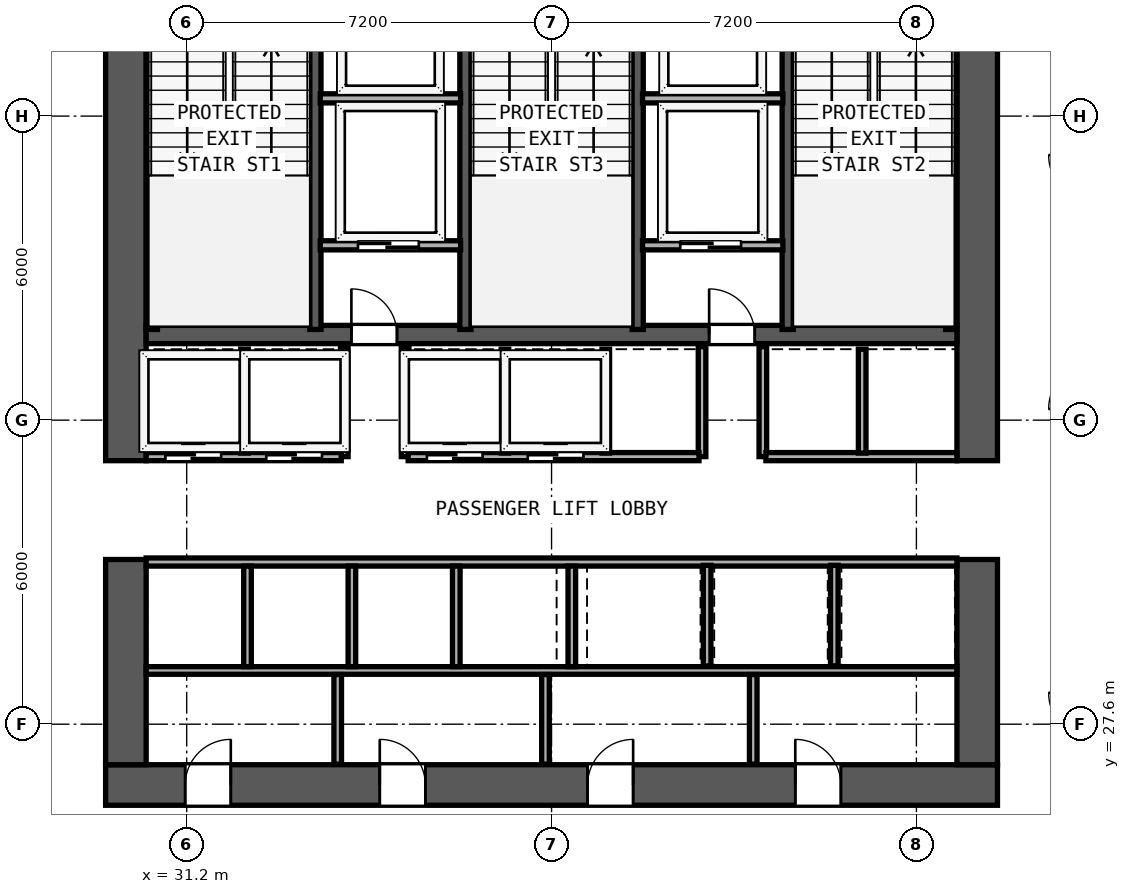
"""IFC4 building model, lengths in metres.
Left out: names, types, materials, properties, quantities, classifications, styles, units other than length and angle.
Written with IfcOpenShell. Run it as: python <this file> out.ifc"""

import sys

from ifc_helpers import new_model, si_unit, direction, frame, frame_2d, origin, place, context, subcontext, project, spatial, rectangle, extrude, element, fill, save


model = new_model("IFC4")
c1 = context("Model", 3, precision=1e-05, world=origin(), true_north=direction((0.0, 1.0)))
c2 = subcontext(c1, "Body", "Model", "MODEL_VIEW")
j1 = project(units=[si_unit("LENGTHUNIT", "METRE"), si_unit("PLANEANGLEUNIT", "RADIAN")], contexts=[c1])
p1 = place(None, origin())
s1 = spatial("IfcSite", under=j1, at=p1, CompositionType="ELEMENT")
p2 = place(p1, origin())
s2 = spatial("IfcBuilding", under=s1, at=p2, CompositionType="ELEMENT")
p3 = place(p2, frame((0.0, 0.0, 85.6)))
s3 = spatial("IfcBuildingStorey", under=s2, at=p3, CompositionType="ELEMENT", Elevation=85.6)
p4 = place(p3, frame((29.6, 26.4, 0.0), z_axis=(0.0, 0.0, 1.0), x_axis=(1.0, 0.0, 0.0)))
e1 = element("IfcWall", 1, at=p4, inside=s3, PredefinedType="SHEAR", context=c2, shape_type="SweptSolid", body=[
    extrude(rectangle(XDim=17.6, YDim=0.8, at=frame_2d((8.8, 0.0))), origin(), (0.0, 0.0, 1.0), 3.54),
])
p5 = place(p4, frame((2.47, 0.0, 0.0), z_axis=(0.0, 0.0, 1.0), x_axis=(-1.0, 0.0, 0.0)))
e2 = element("IfcOpeningElement", 2, at=p5, cuts=e1, PredefinedType="OPENING", context=c2, shape_type="SweptSolid", body=[
    extrude(rectangle(XDim=0.9, YDim=2.1, at=frame_2d((0.45, 1.05))), frame((0.0, 0.41, 0.0), z_axis=(0.0, -1.0, 0.0), x_axis=(1.0, 0.0, 0.0)), (0.0, 0.0, 1.0), 0.82),
])
p6 = place(p4, frame((6.31, 0.0, 0.0), z_axis=(0.0, 0.0, 1.0), x_axis=(-1.0, 0.0, 0.0)))
e3 = element("IfcOpeningElement", 3, at=p6, cuts=e1, PredefinedType="OPENING", context=c2, shape_type="SweptSolid", body=[
    extrude(rectangle(XDim=0.9, YDim=2.1, at=frame_2d((0.45, 1.05))), frame((0.0, 0.41, 0.0), z_axis=(0.0, -1.0, 0.0), x_axis=(1.0, 0.0, 0.0)), (0.0, 0.0, 1.0), 0.82),
])
p7 = place(p4, frame((10.41, 0.0, 0.0), z_axis=(0.0, 0.0, 1.0), x_axis=(-1.0, 0.0, 0.0)))
e4 = element("IfcOpeningElement", 4, at=p7, cuts=e1, PredefinedType="OPENING", context=c2, shape_type="SweptSolid", body=[
    extrude(rectangle(XDim=0.9, YDim=2.1, at=frame_2d((0.45, 1.05))), frame((0.0, 0.41, 0.0), z_axis=(0.0, -1.0, 0.0), x_axis=(1.0, 0.0, 0.0)), (0.0, 0.0, 1.0), 0.82),
])
p8 = place(p4, frame((14.51, 0.0, 0.0), z_axis=(0.0, 0.0, 1.0), x_axis=(-1.0, 0.0, 0.0)))
e5 = element("IfcOpeningElement", 5, at=p8, cuts=e1, PredefinedType="OPENING", context=c2, shape_type="SweptSolid", body=[
    extrude(rectangle(XDim=0.9, YDim=2.1, at=frame_2d((0.45, 1.05))), frame((0.0, 0.41, 0.0), z_axis=(0.0, -1.0, 0.0), x_axis=(1.0, 0.0, 0.0)), (0.0, 0.0, 1.0), 0.82),
])
p9 = place(p3, frame((30.0, 26.8, 0.0), z_axis=(0.0, 0.0, 1.0), x_axis=(0.0, 1.0, 0.0)))
e6 = element("IfcWall", 6, at=p9, inside=s3, PredefinedType="SHEAR", context=c2, shape_type="SweptSolid", body=[
    extrude(rectangle(XDim=4.05, YDim=0.8, at=frame_2d((2.025, 0.0))), origin(), (0.0, 0.0, 1.0), 3.54),
])
p10 = place(p3, frame((30.0, 32.8, 0.0), z_axis=(0.0, 0.0, 1.0), x_axis=(0.0, 1.0, 0.0)))
e7 = element("IfcWall", 7, at=p10, inside=s3, PredefinedType="SHEAR", context=c2, shape_type="SweptSolid", body=[
    extrude(rectangle(XDim=10.0, YDim=0.8, at=frame_2d((5.0, 0.0))), origin(), (0.0, 0.0, 1.0), 3.54),
])
p11 = place(p3, frame((46.8, 26.8, 0.0), z_axis=(0.0, 0.0, 1.0), x_axis=(0.0, 1.0, 0.0)))
e8 = element("IfcWall", 8, at=p11, inside=s3, PredefinedType="SHEAR", context=c2, shape_type="SweptSolid", body=[
    extrude(rectangle(XDim=4.05, YDim=0.8, at=frame_2d((2.025, 0.0))), origin(), (0.0, 0.0, 1.0), 3.54),
])
p12 = place(p3, frame((46.8, 32.8, 0.0), z_axis=(0.0, 0.0, 1.0), x_axis=(0.0, 1.0, 0.0)))
e9 = element("IfcWall", 9, at=p12, inside=s3, PredefinedType="SHEAR", context=c2, shape_type="SweptSolid", body=[
    extrude(rectangle(XDim=10.0, YDim=0.8, at=frame_2d((5.0, 0.0))), origin(), (0.0, 0.0, 1.0), 3.54),
])
p13 = place(p3, frame((30.4, 35.29, 0.0), z_axis=(0.0, 0.0, 1.0), x_axis=(1.0, 0.0, 0.0)))
e10 = element("IfcWall", 10, at=p13, inside=s3, PredefinedType="SHEAR", context=c2, shape_type="SweptSolid", body=[
    extrude(rectangle(XDim=16.0, YDim=0.36, at=frame_2d((8.0, 0.0))), origin(), (0.0, 0.0, 1.0), 3.54),
])
p14 = place(p13, frame((4.95, 0.0, 0.0), z_axis=(0.0, 0.0, 1.0), x_axis=(-1.0, 0.0, 0.0)))
e11 = element("IfcOpeningElement", 11, at=p14, cuts=e10, PredefinedType="OPENING", context=c2, shape_type="SweptSolid", body=[
    extrude(rectangle(XDim=0.9, YDim=2.1, at=frame_2d((0.45, 1.05))), frame((0.0, 0.19, 0.0), z_axis=(0.0, -1.0, 0.0), x_axis=(1.0, 0.0, 0.0)), (0.0, 0.0, 1.0), 0.38),
])
p15 = place(p13, frame((12.01, 0.0, 0.0), z_axis=(0.0, 0.0, 1.0), x_axis=(-1.0, 0.0, 0.0)))
e12 = element("IfcOpeningElement", 12, at=p15, cuts=e10, PredefinedType="OPENING", context=c2, shape_type="SweptSolid", body=[
    extrude(rectangle(XDim=0.9, YDim=2.1, at=frame_2d((0.45, 1.05))), frame((0.0, 0.19, 0.0), z_axis=(0.0, -1.0, 0.0), x_axis=(1.0, 0.0, 0.0)), (0.0, 0.0, 1.0), 0.38),
])
for number, where, z_axis, x_axis in (
    (13, (30.512, 35.39, 0.0), (0.0, 0.0, 1.0), (0.0, 1.0, 0.0)),
    (14, (33.74, 35.39, 0.0), (0.0, 0.0, 1.0), (0.0, 1.0, 0.0)),
    (15, (36.7, 35.39, 0.0), (0.0, 0.0, 1.0), (0.0, 1.0, 0.0)),
    (16, (40.1, 35.39, 0.0), (0.0, 0.0, 1.0), (0.0, 1.0, 0.0)),
    (17, (43.06, 35.39, 0.0), (0.0, 0.0, 1.0), (0.0, 1.0, 0.0)),
    (18, (46.288, 35.39, 0.0), (0.0, 0.0, 1.0), (0.0, 1.0, 0.0)),
):
    element("IfcWall", number, at=place(p3, frame(where, z_axis=z_axis, x_axis=x_axis)), inside=s3, PredefinedType="SHEAR", context=c2, shape_type="SweptSolid", body=[
        extrude(rectangle(XDim=7.41, YDim=0.22, at=frame_2d((3.705, 0.0))), origin(), (0.0, 0.0, 1.0), 3.54),
    ])
for number, where, z_axis, x_axis in (
    (19, (33.835, 39.95, 0.0), (0.0, 0.0, 1.0), (1.0, 0.0, 0.0)),
    (20, (40.195, 39.95, 0.0), (0.0, 0.0, 1.0), (1.0, 0.0, 0.0)),
):
    element("IfcWall", number, at=place(p3, frame(where, z_axis=z_axis, x_axis=x_axis)), inside=s3, PredefinedType="SOLIDWALL", context=c2, shape_type="SweptSolid", body=[
        extrude(rectangle(XDim=2.77, YDim=0.18, at=frame_2d((1.385, 0.0))), origin(), (0.0, 0.0, 1.0), 3.54),
    ])
p16 = place(p3, frame((33.835, 37.05, 0.0), z_axis=(0.0, 0.0, 1.0), x_axis=(1.0, 0.0, 0.0)))
e21 = element("IfcWall", 21, at=p16, inside=s3, PredefinedType="SOLIDWALL", context=c2, shape_type="SweptSolid", body=[
    extrude(rectangle(XDim=2.77, YDim=0.18, at=frame_2d((1.385, 0.0))), origin(), (0.0, 0.0, 1.0), 3.54),
])
p17 = place(p16, frame((1.945, 0.0, 0.0), z_axis=(0.0, 0.0, 1.0), x_axis=(-1.0, 0.0, 0.0)))
e22 = element("IfcOpeningElement", 22, at=p17, cuts=e21, PredefinedType="OPENING", context=c2, shape_type="SweptSolid", body=[
    extrude(rectangle(XDim=1.2, YDim=2.2, at=frame_2d((0.6, 1.1))), frame((0.0, 0.1, 0.0), z_axis=(0.0, -1.0, 0.0), x_axis=(1.0, 0.0, 0.0)), (0.0, 0.0, 1.0), 0.2),
])
for number, where, z_axis, x_axis in (
    (23, (34.31, 32.88, 0.0), (0.0, 0.0, 1.0), (0.0, 1.0, 0.0)),
    (24, (35.51, 32.88, 0.0), (0.0, 0.0, 1.0), (0.0, 1.0, 0.0)),
):
    element("IfcWall", number, at=place(p3, frame(where, z_axis=z_axis, x_axis=x_axis)), inside=s3, PredefinedType="SOLIDWALL", context=c2, shape_type="SweptSolid", body=[
        extrude(rectangle(XDim=2.17, YDim=0.15, at=frame_2d((1.085, 0.0))), origin(), (0.0, 0.0, 1.0), 3.54),
    ])
p18 = place(p3, frame((40.195, 37.05, 0.0), z_axis=(0.0, 0.0, 1.0), x_axis=(1.0, 0.0, 0.0)))
e25 = element("IfcWall", 25, at=p18, inside=s3, PredefinedType="SOLIDWALL", context=c2, shape_type="SweptSolid", body=[
    extrude(rectangle(XDim=2.77, YDim=0.18, at=frame_2d((1.385, 0.0))), origin(), (0.0, 0.0, 1.0), 3.54),
])
p19 = place(p18, frame((1.945, 0.0, 0.0), z_axis=(0.0, 0.0, 1.0), x_axis=(-1.0, 0.0, 0.0)))
e26 = element("IfcOpeningElement", 26, at=p19, cuts=e25, PredefinedType="OPENING", context=c2, shape_type="SweptSolid", body=[
    extrude(rectangle(XDim=1.2, YDim=2.2, at=frame_2d((0.6, 1.1))), frame((0.0, 0.1, 0.0), z_axis=(0.0, -1.0, 0.0), x_axis=(1.0, 0.0, 0.0)), (0.0, 0.0, 1.0), 0.2),
])
for number, where, z_axis, x_axis in (
    (27, (41.37, 32.88, 0.0), (0.0, 0.0, 1.0), (0.0, 1.0, 0.0)),
    (28, (42.57, 32.88, 0.0), (0.0, 0.0, 1.0), (0.0, 1.0, 0.0)),
):
    element("IfcWall", number, at=place(p3, frame(where, z_axis=z_axis, x_axis=x_axis)), inside=s3, PredefinedType="SOLIDWALL", context=c2, shape_type="SweptSolid", body=[
        extrude(rectangle(XDim=2.17, YDim=0.15, at=frame_2d((1.085, 0.0))), origin(), (0.0, 0.0, 1.0), 3.54),
    ])
p20 = place(p3, frame((30.4, 32.88, 0.0), z_axis=(0.0, 0.0, 1.0), x_axis=(1.0, 0.0, 0.0)))
e29 = element("IfcWall", 29, at=p20, inside=s3, PredefinedType="SOLIDWALL", context=c2, shape_type="SweptSolid", body=[
    extrude(rectangle(XDim=3.85, YDim=0.16, at=frame_2d((1.925, 0.0))), origin(), (0.0, 0.0, 1.0), 3.54),
])
p21 = place(p20, frame((1.48, 0.0, 0.0), z_axis=(0.0, 0.0, 1.0), x_axis=(-1.0, 0.0, 0.0)))
e30 = element("IfcOpeningElement", 30, at=p21, cuts=e29, PredefinedType="OPENING", context=c2, shape_type="SweptSolid", body=[
    extrude(rectangle(XDim=1.1, YDim=2.2, at=frame_2d((0.55, 1.1))), frame((0.0, 0.09, 0.0), z_axis=(0.0, -1.0, 0.0), x_axis=(1.0, 0.0, 0.0)), (0.0, 0.0, 1.0), 0.18),
])
p22 = place(p20, frame((3.47, 0.0, 0.0), z_axis=(0.0, 0.0, 1.0), x_axis=(-1.0, 0.0, 0.0)))
e31 = element("IfcOpeningElement", 31, at=p22, cuts=e29, PredefinedType="OPENING", context=c2, shape_type="SweptSolid", body=[
    extrude(rectangle(XDim=1.1, YDim=2.2, at=frame_2d((0.55, 1.1))), frame((0.0, 0.09, 0.0), z_axis=(0.0, -1.0, 0.0), x_axis=(1.0, 0.0, 0.0)), (0.0, 0.0, 1.0), 0.18),
])
p23 = place(p3, frame((35.57, 32.88, 0.0), z_axis=(0.0, 0.0, 1.0), x_axis=(1.0, 0.0, 0.0)))
e32 = element("IfcWall", 32, at=p23, inside=s3, PredefinedType="SOLIDWALL", context=c2, shape_type="SweptSolid", body=[
    extrude(rectangle(XDim=5.74, YDim=0.16, at=frame_2d((2.87, 0.0))), origin(), (0.0, 0.0, 1.0), 3.54),
])
p24 = place(p23, frame((1.47, 0.0, 0.0), z_axis=(0.0, 0.0, 1.0), x_axis=(-1.0, 0.0, 0.0)))
e33 = element("IfcOpeningElement", 33, at=p24, cuts=e32, PredefinedType="OPENING", context=c2, shape_type="SweptSolid", body=[
    extrude(rectangle(XDim=1.1, YDim=2.2, at=frame_2d((0.55, 1.1))), frame((0.0, 0.09, 0.0), z_axis=(0.0, -1.0, 0.0), x_axis=(1.0, 0.0, 0.0)), (0.0, 0.0, 1.0), 0.18),
])
p25 = place(p23, frame((3.46, 0.0, 0.0), z_axis=(0.0, 0.0, 1.0), x_axis=(-1.0, 0.0, 0.0)))
e34 = element("IfcOpeningElement", 34, at=p25, cuts=e32, PredefinedType="OPENING", context=c2, shape_type="SweptSolid", body=[
    extrude(rectangle(XDim=1.1, YDim=2.2, at=frame_2d((0.55, 1.1))), frame((0.0, 0.09, 0.0), z_axis=(0.0, -1.0, 0.0), x_axis=(1.0, 0.0, 0.0)), (0.0, 0.0, 1.0), 0.18),
])
p26 = place(p3, frame((42.63, 32.88, 0.0), z_axis=(0.0, 0.0, 1.0), x_axis=(1.0, 0.0, 0.0)))
e35 = element("IfcWall", 35, at=p26, inside=s3, PredefinedType="SOLIDWALL", context=c2, shape_type="SweptSolid", body=[
    extrude(rectangle(XDim=3.77, YDim=0.16, at=frame_2d((1.885, 0.0))), origin(), (0.0, 0.0, 1.0), 3.54),
])
for number, where, z_axis, x_axis in (
    (36, (32.34, 32.95, 0.0), (0.0, 0.0, 1.0), (0.0, 1.0, 0.0)),
    (37, (37.48, 32.95, 0.0), (0.0, 0.0, 1.0), (0.0, 1.0, 0.0)),
    (38, (39.47, 32.95, 0.0), (0.0, 0.0, 1.0), (0.0, 1.0, 0.0)),
    (39, (44.53, 32.95, 0.0), (0.0, 0.0, 1.0), (0.0, 1.0, 0.0)),
):
    element("IfcWall", number, at=place(p3, frame(where, z_axis=z_axis, x_axis=x_axis)), inside=s3, PredefinedType="SOLIDWALL", context=c2, shape_type="SweptSolid", body=[
        extrude(rectangle(XDim=2.05, YDim=0.15, at=frame_2d((1.025, 0.0))), origin(), (0.0, 0.0, 1.0), 3.54),
    ])
p27 = place(p3, frame((30.4, 30.8, 0.0), z_axis=(0.0, 0.0, 1.0), x_axis=(1.0, 0.0, 0.0)))
e40 = element("IfcWall", 40, at=p27, inside=s3, PredefinedType="SOLIDWALL", context=c2, shape_type="SweptSolid", body=[
    extrude(rectangle(XDim=16.0, YDim=0.16, at=frame_2d((8.0, 0.0))), origin(), (0.0, 0.0, 1.0), 3.54),
])
p28 = place(p3, frame((30.4, 28.66, 0.0), z_axis=(0.0, 0.0, 1.0), x_axis=(1.0, 0.0, 0.0)))
e41 = element("IfcWall", 41, at=p28, inside=s3, PredefinedType="PARTITIONING", context=c2, shape_type="SweptSolid", body=[
    extrude(rectangle(XDim=16.0, YDim=0.15, at=frame_2d((8.0, 0.0))), origin(), (0.0, 0.0, 1.0), 3.54),
])
for number, where, z_axis, x_axis in (
    (42, (32.4, 28.735, 0.0), (0.0, 0.0, 1.0), (0.0, 1.0, 0.0)),
    (43, (34.46, 28.735, 0.0), (0.0, 0.0, 1.0), (0.0, 1.0, 0.0)),
    (44, (36.52, 28.735, 0.0), (0.0, 0.0, 1.0), (0.0, 1.0, 0.0)),
    (45, (38.8, 28.735, 0.0), (0.0, 0.0, 1.0), (0.0, 1.0, 0.0)),
):
    element("IfcWall", number, at=place(p3, frame(where, z_axis=z_axis, x_axis=x_axis)), inside=s3, PredefinedType="SOLIDWALL", context=c2, shape_type="SweptSolid", body=[
        extrude(rectangle(XDim=1.985, YDim=0.15, at=frame_2d((0.992, 0.0))), origin(), (0.0, 0.0, 1.0), 3.54),
    ])
for number, where, z_axis, x_axis in (
    (46, (34.18, 26.81, 0.0), (0.0, 0.0, 1.0), (0.0, 1.0, 0.0)),
    (47, (38.28, 26.81, 0.0), (0.0, 0.0, 1.0), (0.0, 1.0, 0.0)),
    (48, (42.38, 26.81, 0.0), (0.0, 0.0, 1.0), (0.0, 1.0, 0.0)),
):
    element("IfcWall", number, at=place(p3, frame(where, z_axis=z_axis, x_axis=x_axis)), inside=s3, PredefinedType="PARTITIONING", context=c2, shape_type="SweptSolid", body=[
        extrude(rectangle(XDim=1.77, YDim=0.15, at=frame_2d((0.885, 0.0))), origin(), (0.0, 0.0, 1.0), 3.54),
    ])
for number, where, z_axis, x_axis in (
    (49, (41.47, 28.75, 0.0), (0.0, 0.0, 1.0), (0.0, 1.0, 0.0)),
    (50, (43.98, 28.75, 0.0), (0.0, 0.0, 1.0), (0.0, 1.0, 0.0)),
):
    element("IfcWall", number, at=place(p3, frame(where, z_axis=z_axis, x_axis=x_axis)), inside=s3, PredefinedType="SOLIDWALL", context=c2, shape_type="SweptSolid", body=[
        extrude(rectangle(XDim=1.985, YDim=0.15, at=frame_2d((0.993, 0.0))), origin(), (0.0, 0.0, 1.0), 3.54),
    ])
p29 = place(p17, origin())
e51 = element("IfcDoor", 51, at=p29, inside=s3, OperationType="SLIDING_TO_RIGHT", PredefinedType="DOOR", context=c2, shape_type="SweptSolid", body=[
    extrude(rectangle(XDim=1.2, YDim=2.2, at=frame_2d((0.6, 1.1))), frame((0.0, 0.025, 0.0), z_axis=(0.0, -1.0, 0.0), x_axis=(1.0, 0.0, 0.0)), (0.0, 0.0, 1.0), 0.05),
])
fill(e22, e51)
p30 = place(p14, origin())
e52 = element("IfcDoor", 52, at=p30, inside=s3, OperationType="SINGLE_SWING_RIGHT", PredefinedType="DOOR", context=c2, shape_type="SweptSolid", body=[
    extrude(rectangle(XDim=0.9, YDim=2.1, at=frame_2d((0.45, 1.05))), frame((0.0, 0.025, 0.0), z_axis=(0.0, -1.0, 0.0), x_axis=(1.0, 0.0, 0.0)), (0.0, 0.0, 1.0), 0.05),
])
fill(e11, e52)
p31 = place(p19, origin())
e53 = element("IfcDoor", 53, at=p31, inside=s3, OperationType="SLIDING_TO_RIGHT", PredefinedType="DOOR", context=c2, shape_type="SweptSolid", body=[
    extrude(rectangle(XDim=1.2, YDim=2.2, at=frame_2d((0.6, 1.1))), frame((0.0, 0.025, 0.0), z_axis=(0.0, -1.0, 0.0), x_axis=(1.0, 0.0, 0.0)), (0.0, 0.0, 1.0), 0.05),
])
fill(e26, e53)
p32 = place(p15, origin())
e54 = element("IfcDoor", 54, at=p32, inside=s3, OperationType="SINGLE_SWING_RIGHT", PredefinedType="DOOR", context=c2, shape_type="SweptSolid", body=[
    extrude(rectangle(XDim=0.9, YDim=2.1, at=frame_2d((0.45, 1.05))), frame((0.0, 0.025, 0.0), z_axis=(0.0, -1.0, 0.0), x_axis=(1.0, 0.0, 0.0)), (0.0, 0.0, 1.0), 0.05),
])
fill(e12, e54)
p33 = place(p21, origin())
e55 = element("IfcDoor", 55, at=p33, inside=s3, OperationType="SLIDING_TO_LEFT", PredefinedType="DOOR", context=c2, shape_type="SweptSolid", body=[
    extrude(rectangle(XDim=1.1, YDim=2.2, at=frame_2d((0.55, 1.1))), frame((0.0, 0.025, 0.0), z_axis=(0.0, -1.0, 0.0), x_axis=(1.0, 0.0, 0.0)), (0.0, 0.0, 1.0), 0.05),
])
fill(e30, e55)
p34 = place(p22, origin())
e56 = element("IfcDoor", 56, at=p34, inside=s3, OperationType="SLIDING_TO_LEFT", PredefinedType="DOOR", context=c2, shape_type="SweptSolid", body=[
    extrude(rectangle(XDim=1.1, YDim=2.2, at=frame_2d((0.55, 1.1))), frame((0.0, 0.025, 0.0), z_axis=(0.0, -1.0, 0.0), x_axis=(1.0, 0.0, 0.0)), (0.0, 0.0, 1.0), 0.05),
])
fill(e31, e56)
p35 = place(p24, origin())
e57 = element("IfcDoor", 57, at=p35, inside=s3, OperationType="SLIDING_TO_LEFT", PredefinedType="DOOR", context=c2, shape_type="SweptSolid", body=[
    extrude(rectangle(XDim=1.1, YDim=2.2, at=frame_2d((0.55, 1.1))), frame((0.0, 0.025, 0.0), z_axis=(0.0, -1.0, 0.0), x_axis=(1.0, 0.0, 0.0)), (0.0, 0.0, 1.0), 0.05),
])
fill(e33, e57)
p36 = place(p25, origin())
e58 = element("IfcDoor", 58, at=p36, inside=s3, OperationType="SLIDING_TO_LEFT", PredefinedType="DOOR", context=c2, shape_type="SweptSolid", body=[
    extrude(rectangle(XDim=1.1, YDim=2.2, at=frame_2d((0.55, 1.1))), frame((0.0, 0.025, 0.0), z_axis=(0.0, -1.0, 0.0), x_axis=(1.0, 0.0, 0.0)), (0.0, 0.0, 1.0), 0.05),
])
fill(e34, e58)
p37 = place(p5, origin())
e59 = element("IfcDoor", 59, at=p37, inside=s3, OperationType="SINGLE_SWING_LEFT", PredefinedType="DOOR", context=c2, shape_type="SweptSolid", body=[
    extrude(rectangle(XDim=0.9, YDim=2.1, at=frame_2d((0.45, 1.05))), frame((0.0, -0.195, 0.0), z_axis=(0.0, -1.0, 0.0), x_axis=(1.0, 0.0, 0.0)), (0.0, 0.0, 1.0), 0.05),
])
fill(e2, e59)
p38 = place(p6, origin())
e60 = element("IfcDoor", 60, at=p38, inside=s3, OperationType="SINGLE_SWING_RIGHT", PredefinedType="DOOR", context=c2, shape_type="SweptSolid", body=[
    extrude(rectangle(XDim=0.9, YDim=2.1, at=frame_2d((0.45, 1.05))), frame((0.0, -0.195, 0.0), z_axis=(0.0, -1.0, 0.0), x_axis=(1.0, 0.0, 0.0)), (0.0, 0.0, 1.0), 0.05),
])
fill(e3, e60)
p39 = place(p7, origin())
e61 = element("IfcDoor", 61, at=p39, inside=s3, OperationType="SINGLE_SWING_LEFT", PredefinedType="DOOR", context=c2, shape_type="SweptSolid", body=[
    extrude(rectangle(XDim=0.9, YDim=2.1, at=frame_2d((0.45, 1.05))), frame((0.0, -0.195, 0.0), z_axis=(0.0, -1.0, 0.0), x_axis=(1.0, 0.0, 0.0)), (0.0, 0.0, 1.0), 0.05),
])
fill(e4, e61)
p40 = place(p8, origin())
e62 = element("IfcDoor", 62, at=p40, inside=s3, OperationType="SINGLE_SWING_RIGHT", PredefinedType="DOOR", context=c2, shape_type="SweptSolid", body=[
    extrude(rectangle(XDim=0.9, YDim=2.1, at=frame_2d((0.45, 1.05))), frame((0.0, -0.195, 0.0), z_axis=(0.0, -1.0, 0.0), x_axis=(1.0, 0.0, 0.0)), (0.0, 0.0, 1.0), 0.05),
])
fill(e5, e62)
save(model, sys.argv[1])
